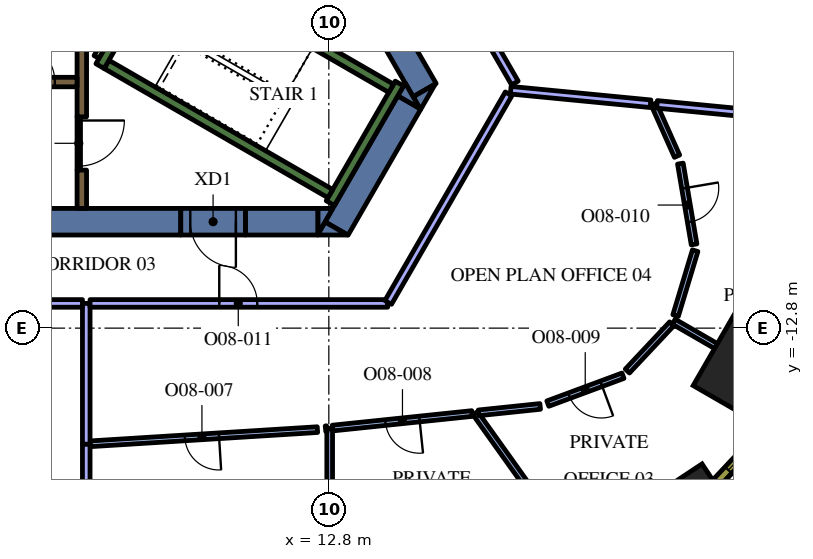
"""IFC4 building model, lengths in metres.
Left out: names, types, materials, properties, quantities, classifications, styles, units other than length and angle.
Written with IfcOpenShell. Run it as: python <this file> out.ifc"""

import sys

from ifc_helpers import new_model, si_unit, direction, frame, frame_2d, origin, origin_2d, place, context, subcontext, project, spatial, polyline, rectangle, outline, extrude, element, fill, save


model = new_model("IFC4")
c1 = context("Model", 3, precision=1e-05, world=origin(), true_north=direction((0.0, 1.0)))
c2 = subcontext(c1, "Body", "Model", "MODEL_VIEW")
j1 = project(units=[si_unit("LENGTHUNIT", "METRE"), si_unit("PLANEANGLEUNIT", "RADIAN")], contexts=[c1])
p1 = place(None, origin())
s1 = spatial("IfcSite", under=j1, at=p1, CompositionType="ELEMENT")
p2 = place(p1, origin())
s2 = spatial("IfcBuilding", under=s1, at=p2, CompositionType="ELEMENT")
p3 = place(p2, frame((0.0, 0.0, 235.2)))
s3 = spatial("IfcBuildingStorey", under=s2, at=p3, CompositionType="ELEMENT", Elevation=235.2)
p4 = place(p3, frame((24.027, -13.872, 0.0), z_axis=(0.0, 0.0, 1.0), x_axis=(0.866025403784, -0.5, 0.0)))
e1 = element("IfcColumn", 1, at=p4, inside=s3, PredefinedType="COLUMN", context=c2, shape_type="SweptSolid", body=[
    extrude(rectangle(XDim=2.4, YDim=2.4, at=origin_2d()), origin(), (0.0, 0.0, 1.0), 4.2),
])
p5 = place(p3, frame((22.494, -16.997, 0.0), z_axis=(0.0, 0.0, 1.0), x_axis=(0.833238868178, 0.552913183563, 0.0)))
e2 = element("IfcColumn", 2, at=p5, inside=s3, PredefinedType="COLUMN", context=c2, shape_type="SweptSolid", body=[
    extrude(rectangle(XDim=0.9, YDim=0.9, at=origin_2d()), origin(), (0.0, 0.0, 1.0), 4.2),
])
p6 = place(p3, frame((9.085, 4.264, 0.0), z_axis=(0.0, 0.0, 1.0), x_axis=(0.499998082512, -0.866026510844, 0.0)))
e3 = element("IfcWall", 3, at=p6, inside=s3, PredefinedType="SOLIDWALL", context=c2, shape_type="SweptSolid", body=[
    extrude(rectangle(XDim=12.472, YDim=0.7, at=frame_2d((6.236, 0.0))), origin(), (0.0, 0.0, 1.0), 4.2),
])
p7 = place(p3, origin())
e4 = element("IfcWall", 4, at=p7, inside=s3, PredefinedType="SOLIDWALL", context=c2, shape_type="SweptSolid", body=[
    extrude(outline(polyline([(15.213, -7.05), (15.019, -6.714), (15.601, -6.378), (15.213, -7.05)])), origin(), (0.0, 0.0, 1.0), 4.2),
])
p8 = place(p3, frame((13.003, -10.179, 0.0), z_axis=(0.0, 0.0, 1.0), x_axis=(0.499972675833, 0.866041178825, 0.0)))
e5 = element("IfcWall", 5, at=p8, inside=s3, PredefinedType="SOLIDWALL", context=c2, shape_type="SweptSolid", body=[
    extrude(rectangle(XDim=3.829, YDim=0.7, at=frame_2d((1.915, 0.0))), origin(), (0.0, 0.0, 1.0), 4.2),
])
e6 = element("IfcWall", 6, at=p7, inside=s3, PredefinedType="SOLIDWALL", context=c2, shape_type="SweptSolid", body=[
    extrude(outline(polyline([(12.5, -10.35), (12.698, -10.005), (13.296, -10.35), (12.5, -10.35)])), origin(), (0.0, 0.0, 1.0), 4.2),
])
e7 = element("IfcWall", 7, at=p7, inside=s3, PredefinedType="SOLIDWALL", context=c2, shape_type="SweptSolid", body=[
    extrude(outline(polyline([(14.809, -6.35), (15.197, -7.022), (14.615, -6.686), (14.809, -6.35)])), origin(), (0.0, 0.0, 1.0), 4.2),
])
p9 = place(p3, frame((10.604, -10.0, 0.0), z_axis=(0.0, 0.0, 1.0), x_axis=(1.0, 0.0, 0.0)))
e8 = element("IfcWall", 8, at=p9, inside=s3, PredefinedType="SOLIDWALL", context=c2, shape_type="SweptSolid", body=[
    extrude(rectangle(XDim=1.909, YDim=0.7, at=frame_2d((0.955, 0.0))), origin(), (0.0, 0.0, 1.0), 4.2),
])
e9 = element("IfcWall", 9, at=p7, inside=s3, PredefinedType="SOLIDWALL", context=c2, shape_type="SweptSolid", body=[
    extrude(outline(polyline([(12.904, -9.65), (12.516, -10.322), (12.516, -9.65), (12.904, -9.65)])), origin(), (0.0, 0.0, 1.0), 4.2),
])
p10 = place(p3, frame((8.904, -10.0, 0.0), z_axis=(0.0, 0.0, 1.0), x_axis=(-1.0, 0.0, 0.0)))
e10 = element("IfcWall", 10, at=p10, inside=s3, PredefinedType="SOLIDWALL", context=c2, shape_type="SweptSolid", body=[
    extrude(rectangle(XDim=22.226, YDim=0.7, at=frame_2d((11.113, 0.0))), origin(), (0.0, 0.0, 1.0), 4.2),
])
p11 = place(p3, frame((12.84, -9.511, 0.0), z_axis=(0.0, 0.0, 1.0), x_axis=(0.500048121057, 0.865997619297, 0.0)))
e11 = element("IfcWall", 11, at=p11, inside=s3, PredefinedType="SOLIDWALL", context=c2, shape_type="SweptSolid", body=[
    extrude(rectangle(XDim=3.634, YDim=0.25, at=frame_2d((1.817, 0.0))), origin(), (0.0, 0.0, 1.0), 4.2),
])
p12 = place(p3, frame((12.84, -9.261, 0.0), z_axis=(0.0, 0.0, 1.0), x_axis=(-0.866013990052, 0.500019768644, 0.0)))
e12 = element("IfcWall", 12, at=p12, inside=s3, PredefinedType="SOLIDWALL", context=c2, shape_type="SweptSolid", body=[
    extrude(rectangle(XDim=6.8, YDim=0.25, at=frame_2d((3.4, 0.0))), origin(), (0.0, 0.0, 1.0), 4.2),
])
p13 = place(p3, frame((6.78, -5.906, 0.0), z_axis=(0.0, 0.0, 1.0), x_axis=(0.500223362819, 0.865896406789, 0.0)))
e13 = element("IfcWall", 13, at=p13, inside=s3, PredefinedType="SOLIDWALL", context=c2, shape_type="SweptSolid", body=[
    extrude(rectangle(XDim=0.675, YDim=0.25, at=frame_2d((0.337, 0.0))), origin(), (0.0, 0.0, 1.0), 4.2),
])
p14 = place(p3, frame((8.334, -2.964, 0.0), z_axis=(0.0, 0.0, 1.0), x_axis=(0.866016039709, -0.500016218704, 0.0)))
e14 = element("IfcWall", 14, at=p14, inside=s3, PredefinedType="SOLIDWALL", context=c2, shape_type="SweptSolid", body=[
    extrude(rectangle(XDim=7.05, YDim=0.25, at=frame_2d((3.525, 0.0))), origin(), (0.0, 0.0, 1.0), 4.2),
])
p15 = place(p3, frame((6.3, -7.24, 0.0), z_axis=(0.0, 0.0, 1.0), x_axis=(0.0, 1.0, 0.0)))
e15 = element("IfcWall", 15, at=p15, inside=s3, PredefinedType="SOLIDWALL", context=c2, shape_type="SweptSolid", body=[
    extrude(rectangle(XDim=3.24, YDim=0.25, at=frame_2d((1.62, 0.0))), origin(), (0.0, 0.0, 1.0), 4.2),
])
p16 = place(p3, frame((6.3, -9.65, 0.0), z_axis=(0.0, 0.0, 1.0), x_axis=(0.0, 1.0, 0.0)))
e16 = element("IfcWall", 16, at=p16, inside=s3, PredefinedType="SOLIDWALL", context=c2, shape_type="SweptSolid", body=[
    extrude(rectangle(XDim=1.008, YDim=0.25, at=frame_2d((0.504, 0.0))), origin(), (0.0, 0.0, 1.0), 4.2),
])
p17 = place(p3, frame((6.945, -5.222, 0.0), z_axis=(0.0, 0.0, 1.0), x_axis=(-0.499818422106, -0.866130212453, 0.0)))
e17 = element("IfcWall", 17, at=p17, inside=s3, PredefinedType="PARTITIONING", context=c2, shape_type="SweptSolid", body=[
    extrude(rectangle(XDim=0.514, YDim=0.15, at=frame_2d((0.257, 0.0))), origin(), (0.0, 0.0, 1.0), 3.45),
])
p18 = place(p3, frame((-6.175, -6.325, 0.0), z_axis=(0.0, 0.0, 1.0), x_axis=(1.0, 0.0, 0.0)))
e18 = element("IfcWall", 18, at=p18, inside=s3, PredefinedType="SOLIDWALL", context=c2, shape_type="SweptSolid", body=[
    extrude(rectangle(XDim=12.35, YDim=0.25, at=frame_2d((6.175, 0.0))), origin(), (0.0, 0.0, 1.0), 4.2),
])
p19 = place(p18, frame((0.585, 0.0, 0.0)))
e19 = element("IfcOpeningElement", 19, at=p19, cuts=e18, PredefinedType="OPENING", context=c2, shape_type="SweptSolid", body=[
    extrude(rectangle(XDim=1.1, YDim=2.1, at=frame_2d((0.55, 1.05))), frame((0.0, 0.135, 0.0), z_axis=(0.0, -1.0, 0.0), x_axis=(1.0, 0.0, 0.0)), (0.0, 0.0, 1.0), 0.27),
])
p20 = place(p18, frame((3.105, 0.0, 0.0)))
e20 = element("IfcOpeningElement", 20, at=p20, cuts=e18, PredefinedType="OPENING", context=c2, shape_type="SweptSolid", body=[
    extrude(rectangle(XDim=1.1, YDim=2.1, at=frame_2d((0.55, 1.05))), frame((0.0, 0.135, 0.0), z_axis=(0.0, -1.0, 0.0), x_axis=(1.0, 0.0, 0.0)), (0.0, 0.0, 1.0), 0.27),
])
p21 = place(p18, frame((5.625, 0.0, 0.0)))
e21 = element("IfcOpeningElement", 21, at=p21, cuts=e18, PredefinedType="OPENING", context=c2, shape_type="SweptSolid", body=[
    extrude(rectangle(XDim=1.1, YDim=2.1, at=frame_2d((0.55, 1.05))), frame((0.0, 0.135, 0.0), z_axis=(0.0, -1.0, 0.0), x_axis=(1.0, 0.0, 0.0)), (0.0, 0.0, 1.0), 0.27),
])
p22 = place(p18, frame((8.145, 0.0, 0.0)))
e22 = element("IfcOpeningElement", 22, at=p22, cuts=e18, PredefinedType="OPENING", context=c2, shape_type="SweptSolid", body=[
    extrude(rectangle(XDim=1.1, YDim=2.1, at=frame_2d((0.55, 1.05))), frame((0.0, 0.135, 0.0), z_axis=(0.0, -1.0, 0.0), x_axis=(1.0, 0.0, 0.0)), (0.0, 0.0, 1.0), 0.27),
])
p23 = place(p18, frame((10.665, 0.0, 0.0)))
e23 = element("IfcOpeningElement", 23, at=p23, cuts=e18, PredefinedType="OPENING", context=c2, shape_type="SweptSolid", body=[
    extrude(rectangle(XDim=1.1, YDim=2.1, at=frame_2d((0.55, 1.05))), frame((0.0, 0.135, 0.0), z_axis=(0.0, -1.0, 0.0), x_axis=(1.0, 0.0, 0.0)), (0.0, 0.0, 1.0), 0.27),
])
p24 = place(p3, frame((6.22, -7.237, 0.0), z_axis=(0.0, 0.0, 1.0), x_axis=(0.0, -1.0, 0.0)))
e24 = element("IfcWall", 24, at=p24, inside=s3, PredefinedType="PARTITIONING", context=c2, shape_type="SweptSolid", body=[
    extrude(rectangle(XDim=1.4, YDim=0.09, at=frame_2d((0.7, 0.0))), origin(), (0.0, 0.0, 1.0), 3.45),
])
p25 = place(p24, frame((0.1, 0.0, 0.0)))
e25 = element("IfcOpeningElement", 25, at=p25, cuts=e24, PredefinedType="OPENING", context=c2, shape_type="SweptSolid", body=[
    extrude(rectangle(XDim=1.2, YDim=2.1, at=frame_2d((0.6, 1.05))), frame((0.0, 0.055, 0.0), z_axis=(0.0, -1.0, 0.0), x_axis=(1.0, 0.0, 0.0)), (0.0, 0.0, 1.0), 0.11),
])
p26 = place(p3, frame((10.604, -10.0, 0.0), z_axis=(0.0, 0.0, 1.0), x_axis=(-1.0, 0.0, 0.0)))
e26 = element("IfcWall", 26, at=p26, inside=s3, PredefinedType="SOLIDWALL", context=c2, shape_type="SweptSolid", body=[
    extrude(rectangle(XDim=1.7, YDim=0.7, at=frame_2d((0.85, 0.0))), origin(), (0.0, 0.0, 1.0), 4.2),
])
p27 = place(p26, frame((0.25, 0.0, 0.0)))
e27 = element("IfcOpeningElement", 27, at=p27, cuts=e26, PredefinedType="OPENING", context=c2, shape_type="SweptSolid", body=[
    extrude(rectangle(XDim=1.2, YDim=2.1, at=frame_2d((0.6, 1.05))), frame((0.0, 0.36, 0.0), z_axis=(0.0, -1.0, 0.0), x_axis=(1.0, 0.0, 0.0)), (0.0, 0.0, 1.0), 0.72),
])
p28 = place(p3, frame((6.417, -15.846, 0.0), z_axis=(0.0, 0.0, 1.0), x_axis=(0.0, -1.0, 0.0)))
e28 = element("IfcWall", 28, at=p28, inside=s3, PredefinedType="PARTITIONING", context=c2, shape_type="SweptSolid", body=[
    extrude(rectangle(XDim=3.051, YDim=0.2, at=frame_2d((1.525, 0.0))), origin(), (0.0, 0.0, 1.0), 3.45),
])
p29 = place(p3, frame((6.417, -12.15, 0.0), z_axis=(0.0, 0.0, 1.0), x_axis=(0.0, -1.0, 0.0)))
e29 = element("IfcWall", 29, at=p29, inside=s3, PredefinedType="PARTITIONING", context=c2, shape_type="SweptSolid", body=[
    extrude(rectangle(XDim=3.704, YDim=0.2, at=frame_2d((1.852, 0.0))), origin(), (0.0, 0.0, 1.0), 3.45),
])
p30 = place(p3, frame((4.53, -12.15, 0.0), z_axis=(0.0, 0.0, 1.0), x_axis=(1.0, 0.0, 0.0)))
e30 = element("IfcWall", 30, at=p30, inside=s3, PredefinedType="PARTITIONING", context=c2, shape_type="SweptSolid", body=[
    extrude(rectangle(XDim=1.787, YDim=0.2, at=frame_2d((0.894, 0.0))), origin(), (0.0, 0.0, 1.0), 3.45),
])
p31 = place(p3, frame((12.823, -15.437, 0.0), z_axis=(0.0, 0.0, 1.0), x_axis=(0.0, -1.0, 0.0)))
e31 = element("IfcWall", 31, at=p31, inside=s3, PredefinedType="PARTITIONING", context=c2, shape_type="SweptSolid", body=[
    extrude(rectangle(XDim=3.058, YDim=0.15, at=frame_2d((1.529, 0.0))), origin(), (0.0, 0.0, 1.0), 3.45),
])
p32 = place(p3, frame((12.5, -15.471, 0.0), z_axis=(0.0, 0.0, 1.0), x_axis=(-0.998061916726, -0.0622286942, 0.0)))
e32 = element("IfcWall", 32, at=p32, inside=s3, PredefinedType="PARTITIONING", context=c2, shape_type="SweptSolid", body=[
    extrude(rectangle(XDim=5.995, YDim=0.15, at=frame_2d((2.998, 0.0))), origin(), (0.0, 0.0, 1.0), 3.45),
])
p33 = place(p32, frame((2.595, 0.0, 0.0)))
e33 = element("IfcOpeningElement", 33, at=p33, cuts=e32, PredefinedType="OPENING", context=c2, shape_type="SweptSolid", body=[
    extrude(rectangle(XDim=0.9, YDim=2.1, at=frame_2d((0.45, 1.05))), frame((0.0, 0.085, 0.0), z_axis=(0.0, -1.0, 0.0), x_axis=(1.0, 0.0, 0.0)), (0.0, 0.0, 1.0), 0.17),
])
p34 = place(p3, frame((12.713, -15.448, 0.0), z_axis=(0.0, 0.0, 1.0), x_axis=(0.995106821048, 0.098804932586, 0.0)))
e34 = element("IfcWall", 34, at=p34, inside=s3, PredefinedType="PARTITIONING", context=c2, shape_type="SweptSolid", body=[
    extrude(rectangle(XDim=0.035, YDim=0.15, at=frame_2d((0.017, 0.0))), origin(), (0.0, 0.0, 1.0), 3.45),
])
p35 = place(p3, frame((16.655, -15.038, 0.0), z_axis=(0.0, 0.0, 1.0), x_axis=(0.580996489012, -0.813906063226, 0.0)))
e35 = element("IfcWall", 35, at=p35, inside=s3, PredefinedType="PARTITIONING", context=c2, shape_type="SweptSolid", body=[
    extrude(rectangle(XDim=3.536, YDim=0.15, at=frame_2d((1.768, 0.0))), origin(), (0.0, 0.0, 1.0), 3.45),
])
p36 = place(p3, frame((16.569, -15.047, 0.0), z_axis=(0.0, 0.0, 1.0), x_axis=(-0.994621532294, -0.103576095197, 0.0)))
e36 = element("IfcWall", 36, at=p36, inside=s3, PredefinedType="PARTITIONING", context=c2, shape_type="SweptSolid", body=[
    extrude(rectangle(XDim=3.691, YDim=0.15, at=frame_2d((1.846, 0.0))), origin(), (0.0, 0.0, 1.0), 3.45),
])
p37 = place(p36, frame((1.391, 0.0, 0.0)))
e37 = element("IfcOpeningElement", 37, at=p37, cuts=e36, PredefinedType="OPENING", context=c2, shape_type="SweptSolid", body=[
    extrude(rectangle(XDim=0.9, YDim=2.1, at=frame_2d((0.45, 1.05))), frame((0.0, 0.085, 0.0), z_axis=(0.0, -1.0, 0.0), x_axis=(1.0, 0.0, 0.0)), (0.0, 0.0, 1.0), 0.17),
])
p38 = place(p3, frame((21.877, -12.63, 0.0), z_axis=(0.0, 0.0, 1.0), x_axis=(0.86599869919, -0.500046250861, 0.0)))
e38 = element("IfcWall", 38, at=p38, inside=s3, PredefinedType="PARTITIONING", context=c2, shape_type="SweptSolid", body=[
    extrude(rectangle(XDim=1.284, YDim=0.15, at=frame_2d((0.642, 0.0))), origin(), (0.0, 0.0, 1.0), 3.45),
])
p39 = place(p3, frame((16.74, -15.029, 0.0), z_axis=(0.0, 0.0, 1.0), x_axis=(0.994614871477, 0.103640037805, 0.0)))
e39 = element("IfcWall", 39, at=p39, inside=s3, PredefinedType="PARTITIONING", context=c2, shape_type="SweptSolid", body=[
    extrude(rectangle(XDim=1.63, YDim=0.15, at=frame_2d((0.815, 0.0))), origin(), (0.0, 0.0, 1.0), 3.45),
])
p40 = place(p3, frame((20.541, -14.052, 0.0), z_axis=(0.0, 0.0, 1.0), x_axis=(-0.937602119917, -0.347710029662, 0.0)))
e40 = element("IfcWall", 40, at=p40, inside=s3, PredefinedType="PARTITIONING", context=c2, shape_type="SweptSolid", body=[
    extrude(rectangle(XDim=2.11, YDim=0.15, at=frame_2d((1.055, 0.0))), origin(), (0.0, 0.0, 1.0), 3.45),
])
p41 = place(p40, frame((0.61, 0.0, 0.0)))
e41 = element("IfcOpeningElement", 41, at=p41, cuts=e40, PredefinedType="OPENING", context=c2, shape_type="SweptSolid", body=[
    extrude(rectangle(XDim=0.9, YDim=2.1, at=frame_2d((0.45, 1.05))), frame((0.0, 0.085, 0.0), z_axis=(0.0, -1.0, 0.0), x_axis=(1.0, 0.0, 0.0)), (0.0, 0.0, 1.0), 0.17),
])
p42 = place(p3, frame((20.656, -13.929, 0.0), z_axis=(0.0, 0.0, 1.0), x_axis=(0.684716940988, 0.728809104447, 0.0)))
e42 = element("IfcWall", 42, at=p42, inside=s3, PredefinedType="PARTITIONING", context=c2, shape_type="SweptSolid", body=[
    extrude(rectangle(XDim=1.705, YDim=0.15, at=frame_2d((0.853, 0.0))), origin(), (0.0, 0.0, 1.0), 3.45),
])
p43 = place(p3, frame((21.925, -12.469, 0.0), z_axis=(0.0, 0.0, 1.0), x_axis=(0.288767705809, 0.957399191603, 0.0)))
e43 = element("IfcWall", 43, at=p43, inside=s3, PredefinedType="PARTITIONING", context=c2, shape_type="SweptSolid", body=[
    extrude(rectangle(XDim=1.782, YDim=0.15, at=frame_2d((0.891, 0.0))), origin(), (0.0, 0.0, 1.0), 3.45),
])
p44 = place(p3, frame((22.05, -8.471, 0.0), z_axis=(0.0, 0.0, 1.0), x_axis=(0.167612004459, -0.985853039738, 0.0)))
e44 = element("IfcWall", 44, at=p44, inside=s3, PredefinedType="PARTITIONING", context=c2, shape_type="SweptSolid", body=[
    extrude(rectangle(XDim=2.156, YDim=0.15, at=frame_2d((1.078, 0.0))), origin(), (0.0, 0.0, 1.0), 3.45),
])
p45 = place(p44, frame((0.656, 0.0, 0.0)))
e45 = element("IfcOpeningElement", 45, at=p45, cuts=e44, PredefinedType="OPENING", context=c2, shape_type="SweptSolid", body=[
    extrude(rectangle(XDim=0.9, YDim=2.1, at=frame_2d((0.45, 1.05))), frame((0.0, 0.085, 0.0), z_axis=(0.0, -1.0, 0.0), x_axis=(1.0, 0.0, 0.0)), (0.0, 0.0, 1.0), 0.17),
])
p46 = place(p3, frame((21.963, -8.276, 0.0), z_axis=(0.0, 0.0, 1.0), x_axis=(-0.407510458183, 0.913200540118, 0.0)))
e46 = element("IfcWall", 46, at=p46, inside=s3, PredefinedType="PARTITIONING", context=c2, shape_type="SweptSolid", body=[
    extrude(rectangle(XDim=1.502, YDim=0.15, at=frame_2d((0.751, 0.0))), origin(), (0.0, 0.0, 1.0), 3.45),
])
p47 = place(p3, frame((21.437, -6.913, 0.0), z_axis=(0.0, 0.0, 1.0), x_axis=(0.995357015301, -0.096251816042, 0.0)))
e47 = element("IfcWall", 47, at=p47, inside=s3, PredefinedType="PARTITIONING", context=c2, shape_type="SweptSolid", body=[
    extrude(rectangle(XDim=3.45, YDim=0.2, at=frame_2d((1.725, 0.0))), origin(), (0.0, 0.0, 1.0), 3.45),
])
p48 = place(p3, frame((17.586, -6.54, 0.0), z_axis=(0.0, 0.0, 1.0), x_axis=(0.995358181524, -0.096239755158, 0.0)))
e48 = element("IfcWall", 48, at=p48, inside=s3, PredefinedType="PARTITIONING", context=c2, shape_type="SweptSolid", body=[
    extrude(rectangle(XDim=3.696, YDim=0.2, at=frame_2d((1.848, 0.0))), origin(), (0.0, 0.0, 1.0), 3.45),
])
p49 = place(p3, frame((6.517, -12.15, 0.0), z_axis=(0.0, 0.0, 1.0), x_axis=(1.0, 0.0, 0.0)))
e49 = element("IfcWall", 49, at=p49, inside=s3, PredefinedType="PARTITIONING", context=c2, shape_type="SweptSolid", body=[
    extrude(rectangle(XDim=7.83, YDim=0.2, at=frame_2d((3.915, 0.0))), origin(), (0.0, 0.0, 1.0), 3.45),
])
p50 = place(p49, frame((3.4, 0.0, 0.0)))
e50 = element("IfcOpeningElement", 50, at=p50, cuts=e49, PredefinedType="OPENING", context=c2, shape_type="SweptSolid", body=[
    extrude(rectangle(XDim=1.0, YDim=2.1, at=frame_2d((0.5, 1.05))), frame((0.0, 0.11, 0.0), z_axis=(0.0, -1.0, 0.0), x_axis=(1.0, 0.0, 0.0)), (0.0, 0.0, 1.0), 0.22),
])
p51 = place(p3, frame((14.362, -12.124, 0.0), z_axis=(0.0, 0.0, 1.0), x_axis=(0.500017005442, 0.866015585465, 0.0)))
e51 = element("IfcWall", 51, at=p51, inside=s3, PredefinedType="PARTITIONING", context=c2, shape_type="SweptSolid", body=[
    extrude(rectangle(XDim=6.338, YDim=0.2, at=frame_2d((3.169, 0.0))), origin(), (0.0, 0.0, 1.0), 3.45),
])
p52 = place(p3, frame((17.696, -6.35, 0.0), z_axis=(0.0, 0.0, 1.0), x_axis=(-0.499976825411, 0.866038783226, 0.0)))
e52 = element("IfcWall", 52, at=p52, inside=s3, PredefinedType="PARTITIONING", context=c2, shape_type="SweptSolid", body=[
    extrude(rectangle(XDim=4.653, YDim=0.2, at=frame_2d((2.326, 0.0))), origin(), (0.0, 0.0, 1.0), 3.45),
])
p53 = place(p3, frame((22.989, -16.879, 0.0), z_axis=(0.0, 0.0, 1.0), x_axis=(0.684770274166, 0.728758994194, 0.0)))
e53 = element("IfcWall", 53, at=p53, inside=s3, PredefinedType="SOLIDWALL", context=c2, shape_type="SweptSolid", body=[
    extrude(rectangle(XDim=1.948, YDim=0.24, at=frame_2d((0.974, 0.0))), origin(), (0.0, 0.0, 1.0), 3.95),
])
p54 = place(p53, frame((0.474, 0.0, 0.9)))
e54 = element("IfcOpeningElement", 54, at=p54, cuts=e53, PredefinedType="OPENING", context=c2, shape_type="SweptSolid", body=[
    extrude(rectangle(XDim=1.0, YDim=2.55, at=frame_2d((0.5, 1.275))), frame((0.0, 0.13, 0.0), z_axis=(0.0, -1.0, 0.0), x_axis=(1.0, 0.0, 0.0)), (0.0, 0.0, 1.0), 0.26),
])
p55 = place(p3, frame((25.405, -6.861, 0.0), z_axis=(0.0, 0.0, 1.0), x_axis=(-0.407579651789, 0.913169659728, 0.0)))
e55 = element("IfcWall", 55, at=p55, inside=s3, PredefinedType="SOLIDWALL", context=c2, shape_type="SweptSolid", body=[
    extrude(rectangle(XDim=5.311, YDim=0.24, at=frame_2d((2.655, 0.0))), origin(), (0.0, 0.0, 1.0), 3.95),
])
p56 = place(p55, frame((0.271, 0.0, 0.9)))
e56 = element("IfcOpeningElement", 56, at=p56, cuts=e55, PredefinedType="OPENING", context=c2, shape_type="SweptSolid", body=[
    extrude(rectangle(XDim=1.5, YDim=2.55, at=frame_2d((0.75, 1.275))), frame((0.0, 0.13, 0.0), z_axis=(0.0, -1.0, 0.0), x_axis=(1.0, 0.0, 0.0)), (0.0, 0.0, 1.0), 0.26),
])
p57 = place(p55, frame((3.504, 0.0, 0.9)))
e57 = element("IfcOpeningElement", 57, at=p57, cuts=e55, PredefinedType="OPENING", context=c2, shape_type="SweptSolid", body=[
    extrude(rectangle(XDim=1.5, YDim=2.55, at=frame_2d((0.75, 1.275))), frame((0.0, 0.13, 0.0), z_axis=(0.0, -1.0, 0.0), x_axis=(1.0, 0.0, 0.0)), (0.0, 0.0, 1.0), 0.26),
])
p58 = place(p23, origin())
e58 = element("IfcDoor", 58, at=p58, inside=s3, OperationType="DOUBLE_DOOR_SLIDING", PredefinedType="DOOR", context=c2, shape_type="SweptSolid", body=[
    extrude(rectangle(XDim=1.1, YDim=2.1, at=frame_2d((0.55, 1.05))), frame((0.0, 0.025, 0.0), z_axis=(0.0, -1.0, 0.0), x_axis=(1.0, 0.0, 0.0)), (0.0, 0.0, 1.0), 0.05),
])
fill(e23, e58)
p59 = place(p25, origin())
e59 = element("IfcDoor", 59, at=p59, inside=s3, OperationType="SINGLE_SWING_LEFT", PredefinedType="DOOR", context=c2, shape_type="SweptSolid", body=[
    extrude(rectangle(XDim=1.2, YDim=2.1, at=frame_2d((0.6, 1.05))), frame((0.0, 0.025, 0.0), z_axis=(0.0, -1.0, 0.0), x_axis=(1.0, 0.0, 0.0)), (0.0, 0.0, 1.0), 0.05),
])
fill(e25, e59)
p60 = place(p27, origin())
e60 = element("IfcDoor", 60, at=p60, inside=s3, OperationType="SINGLE_SWING_LEFT", PredefinedType="DOOR", context=c2, shape_type="SweptSolid", body=[
    extrude(rectangle(XDim=1.2, YDim=2.1, at=frame_2d((0.6, 1.05))), frame((0.0, 0.025, 0.0), z_axis=(0.0, -1.0, 0.0), x_axis=(1.0, 0.0, 0.0)), (0.0, 0.0, 1.0), 0.05),
])
fill(e27, e60)
p61 = place(p33, origin())
e61 = element("IfcDoor", 61, at=p61, inside=s3, OperationType="SINGLE_SWING_RIGHT", PredefinedType="DOOR", context=c2, shape_type="SweptSolid", body=[
    extrude(rectangle(XDim=0.9, YDim=2.1, at=frame_2d((0.45, 1.05))), frame((0.0, 0.025, 0.0), z_axis=(0.0, -1.0, 0.0), x_axis=(1.0, 0.0, 0.0)), (0.0, 0.0, 1.0), 0.05),
])
fill(e33, e61)
p62 = place(p37, origin())
e62 = element("IfcDoor", 62, at=p62, inside=s3, OperationType="SINGLE_SWING_LEFT", PredefinedType="DOOR", context=c2, shape_type="SweptSolid", body=[
    extrude(rectangle(XDim=0.9, YDim=2.1, at=frame_2d((0.45, 1.05))), frame((0.0, 0.025, 0.0), z_axis=(0.0, -1.0, 0.0), x_axis=(1.0, 0.0, 0.0)), (0.0, 0.0, 1.0), 0.05),
])
fill(e37, e62)
p63 = place(p41, origin())
e63 = element("IfcDoor", 63, at=p63, inside=s3, OperationType="SINGLE_SWING_RIGHT", PredefinedType="DOOR", context=c2, shape_type="SweptSolid", body=[
    extrude(rectangle(XDim=0.9, YDim=2.1, at=frame_2d((0.45, 1.05))), frame((0.0, 0.025, 0.0), z_axis=(0.0, -1.0, 0.0), x_axis=(1.0, 0.0, 0.0)), (0.0, 0.0, 1.0), 0.05),
])
fill(e41, e63)
p64 = place(p45, origin())
e64 = element("IfcDoor", 64, at=p64, inside=s3, OperationType="SINGLE_SWING_RIGHT", PredefinedType="DOOR", context=c2, shape_type="SweptSolid", body=[
    extrude(rectangle(XDim=0.9, YDim=2.1, at=frame_2d((0.45, 1.05))), frame((0.0, 0.025, 0.0), z_axis=(0.0, -1.0, 0.0), x_axis=(1.0, 0.0, 0.0)), (0.0, 0.0, 1.0), 0.05),
])
fill(e45, e64)
p65 = place(p50, origin())
e65 = element("IfcDoor", 65, at=p65, inside=s3, OperationType="SINGLE_SWING_LEFT", PredefinedType="DOOR", context=c2, shape_type="SweptSolid", body=[
    extrude(rectangle(XDim=1.0, YDim=2.1, at=frame_2d((0.5, 1.05))), frame((0.0, 0.025, 0.0), z_axis=(0.0, -1.0, 0.0), x_axis=(1.0, 0.0, 0.0)), (0.0, 0.0, 1.0), 0.05),
])
fill(e50, e65)
p66 = place(p54, origin())
e66 = element("IfcWindow", 66, at=p66, inside=s3, PartitioningType="SINGLE_PANEL", PredefinedType="WINDOW", context=c2, shape_type="SweptSolid", body=[
    extrude(rectangle(XDim=1.0, YDim=2.55, at=frame_2d((0.5, 1.275))), frame((0.0, 0.04, 0.0), z_axis=(0.0, -1.0, 0.0), x_axis=(1.0, 0.0, 0.0)), (0.0, 0.0, 1.0), 0.06),
])
fill(e54, e66)
save(model, sys.argv[1])
